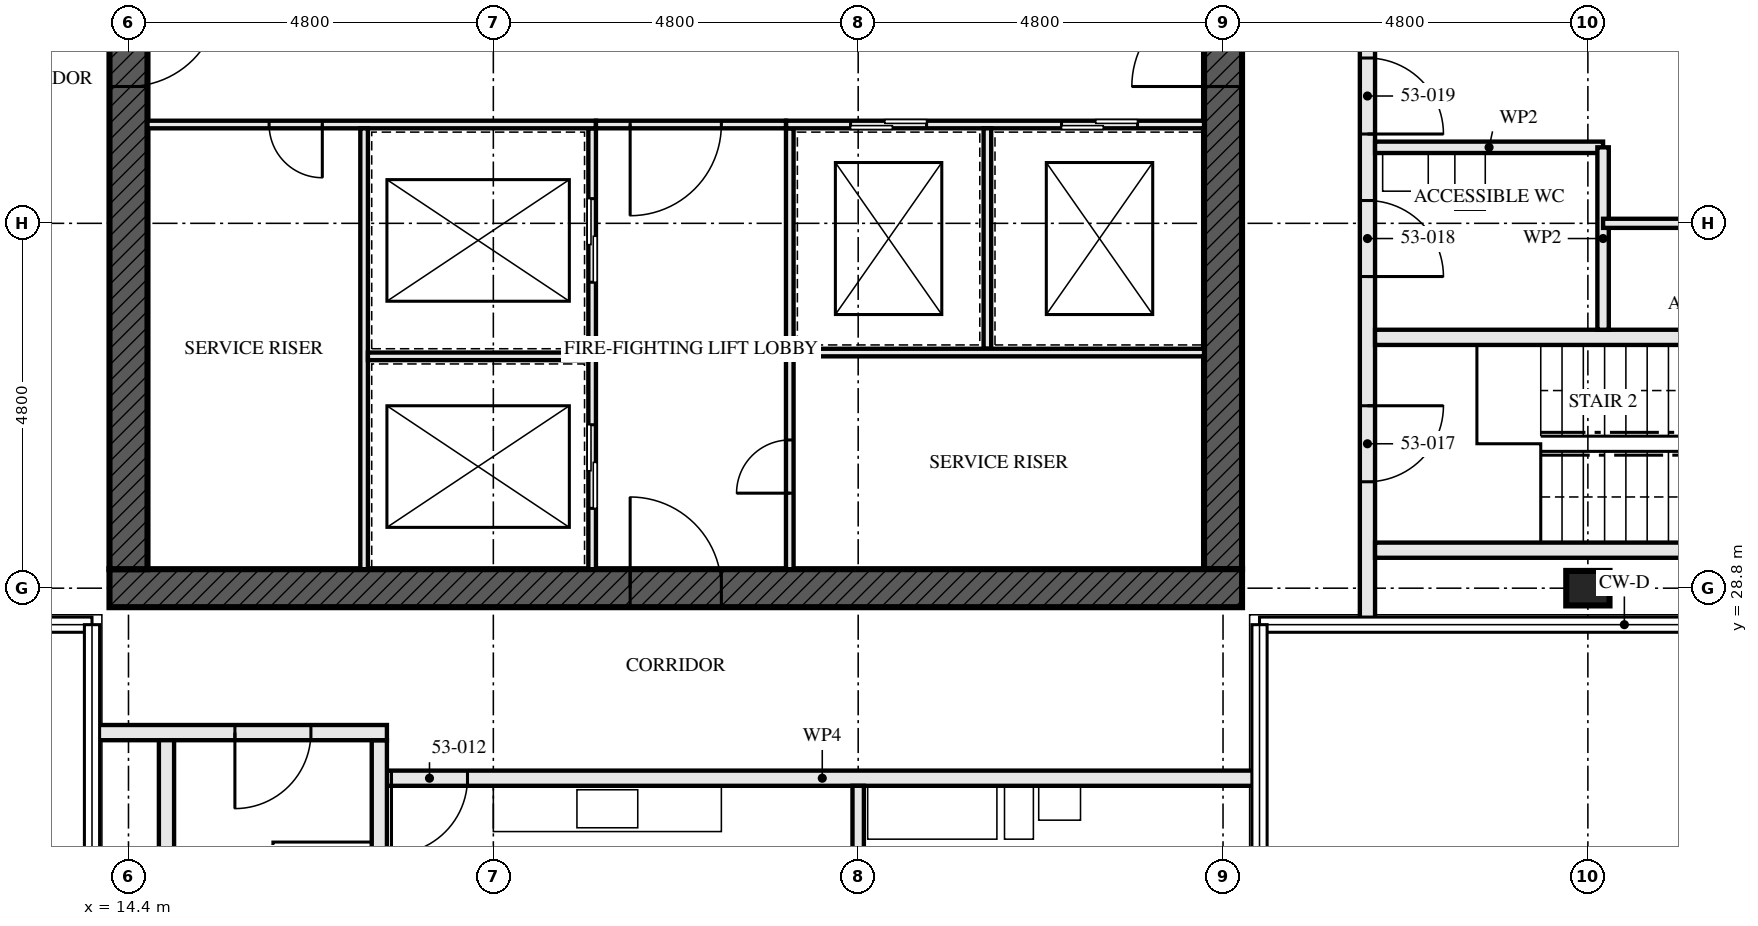
"""IFC4 building model, lengths in metres.
Left out: names, types, materials, properties, quantities, classifications, styles, units other than length and angle.
Written with IfcOpenShell. Run it as: python <this file> out.ifc"""

import sys

from ifc_helpers import new_model, si_unit, direction, frame, frame_2d, origin, origin_2d, place, context, subcontext, project, spatial, rectangle, i_section, extrude, element, fill, save


model = new_model("IFC4")
c1 = context("Model", 3, precision=1e-05, world=origin(), true_north=direction((0.0, 1.0)))
c2 = subcontext(c1, "Body", "Model", "MODEL_VIEW")
j1 = project(units=[si_unit("LENGTHUNIT", "METRE"), si_unit("PLANEANGLEUNIT", "RADIAN")], contexts=[c1])
p1 = place(None, origin())
s1 = spatial("IfcSite", under=j1, at=p1, CompositionType="ELEMENT")
p2 = place(p1, origin())
s2 = spatial("IfcBuilding", under=s1, at=p2, CompositionType="ELEMENT")
p3 = place(p2, frame((0.0, 0.0, 194.5)))
s3 = spatial("IfcBuildingStorey", under=s2, at=p3, CompositionType="ELEMENT", Elevation=194.5)
p4 = place(p3, frame((33.6, 28.8, 0.0), z_axis=(0.0, 0.0, 1.0), x_axis=(0.0, 1.0, 0.0)))
e1 = element("IfcColumn", 1, at=p4, inside=s3, PredefinedType="COLUMN", context=c2, shape_type="SweptSolid", body=[
    extrude(i_section(OverallWidth=0.454, OverallDepth=0.569, WebThickness=0.078, FlangeThickness=0.125, FilletRadius=0.015, at=origin_2d()), origin(), (0.0, 0.0, 1.0), 3.5),
])
p5 = place(p3, frame((14.15, 28.8, -0.17), z_axis=(0.0, 0.0, 1.0), x_axis=(1.0, 0.0, 0.0)))
e2 = element("IfcWall", 2, at=p5, inside=s3, PredefinedType="SHEAR", context=c2, shape_type="SweptSolid", body=[
    extrude(rectangle(XDim=14.9, YDim=0.5, at=frame_2d((7.45, 0.0))), origin(), (0.0, 0.0, 1.0), 3.5),
])
p6 = place(p5, frame((6.85, 0.0, 0.17)))
e3 = element("IfcOpeningElement", 3, at=p6, cuts=e2, PredefinedType="OPENING", context=c2, shape_type="SweptSolid", body=[
    extrude(rectangle(XDim=1.2, YDim=2.1, at=frame_2d((0.6, 1.05))), frame((0.0, 0.26, 0.0), z_axis=(0.0, -1.0, 0.0), x_axis=(1.0, 0.0, 0.0)), (0.0, 0.0, 1.0), 0.521),
])
p7 = place(p3, frame((14.4, 42.95, -0.17), z_axis=(0.0, 0.0, 1.0), x_axis=(0.0, -1.0, 0.0)))
e4 = element("IfcWall", 4, at=p7, inside=s3, PredefinedType="SHEAR", context=c2, shape_type="SweptSolid", body=[
    extrude(rectangle(XDim=13.9, YDim=0.5, at=frame_2d((6.95, 0.0))), origin(), (0.0, 0.0, 1.0), 3.5),
])
p8 = place(p7, frame((6.35, 0.0, 0.17)))
e5 = element("IfcOpeningElement", 5, at=p8, cuts=e4, PredefinedType="OPENING", context=c2, shape_type="SweptSolid", body=[
    extrude(rectangle(XDim=1.2, YDim=2.1, at=frame_2d((0.6, 1.05))), frame((0.0, 0.26, 0.0), z_axis=(0.0, -1.0, 0.0), x_axis=(1.0, 0.0, 0.0)), (0.0, 0.0, 1.0), 0.521),
])
p9 = place(p3, frame((28.8, 29.05, -0.17), z_axis=(0.0, 0.0, 1.0), x_axis=(0.0, 1.0, 0.0)))
e6 = element("IfcWall", 6, at=p9, inside=s3, PredefinedType="SHEAR", context=c2, shape_type="SweptSolid", body=[
    extrude(rectangle(XDim=13.9, YDim=0.5, at=frame_2d((6.95, 0.0))), origin(), (0.0, 0.0, 1.0), 3.5),
])
p10 = place(p9, frame((6.35, 0.0, 0.17)))
e7 = element("IfcOpeningElement", 7, at=p10, cuts=e6, PredefinedType="OPENING", context=c2, shape_type="SweptSolid", body=[
    extrude(rectangle(XDim=1.2, YDim=2.1, at=frame_2d((0.6, 1.05))), frame((0.0, 0.26, 0.0), z_axis=(0.0, -1.0, 0.0), x_axis=(1.0, 0.0, 0.0)), (0.0, 0.0, 1.0), 0.521),
])
for number, where, z_axis, x_axis in (
    (8, (14.9, 22.1, 0.0), (0.0, 0.0, 1.0), (0.0, 1.0, 0.0)),
    (9, (17.7, 22.1, 0.0), (0.0, 0.0, 1.0), (0.0, 1.0, 0.0)),
):
    element("IfcWall", number, at=place(p3, frame(where, z_axis=z_axis, x_axis=x_axis)), inside=s3, PredefinedType="SOLIDWALL", context=c2, shape_type="SweptSolid", body=[
        extrude(rectangle(XDim=4.7, YDim=0.2, at=frame_2d((2.35, 0.0))), origin(), (0.0, 0.0, 1.0), 2.99),
    ])
p11 = place(p3, frame((13.945, 26.9, 0.0), z_axis=(0.0, 0.0, 1.0), x_axis=(1.0, 0.0, 0.0)))
e10 = element("IfcWall", 10, at=p11, inside=s3, PredefinedType="SOLIDWALL", context=c2, shape_type="SweptSolid", body=[
    extrude(rectangle(XDim=3.855, YDim=0.2, at=frame_2d((1.927, 0.0))), origin(), (0.0, 0.0, 1.0), 2.32),
])
p12 = place(p11, frame((1.855, 0.0, 0.0)))
e11 = element("IfcOpeningElement", 11, at=p12, cuts=e10, PredefinedType="OPENING", context=c2, shape_type="SweptSolid", body=[
    extrude(rectangle(XDim=1.0, YDim=2.1, at=frame_2d((0.5, 1.05))), frame((0.0, 0.111, 0.0), z_axis=(0.0, -1.0, 0.0), x_axis=(1.0, 0.0, 0.0)), (0.0, 0.0, 1.0), 0.221),
])
p13 = place(p3, frame((24.0, 23.2, 0.0), z_axis=(0.0, 0.0, 1.0), x_axis=(0.0, 1.0, 0.0)))
e12 = element("IfcWall", 12, at=p13, inside=s3, PredefinedType="PARTITIONING", context=c2, shape_type="SweptSolid", body=[
    extrude(rectangle(XDim=3.0, YDim=0.15, at=frame_2d((1.5, 0.0))), origin(), (0.0, 0.0, 1.0), 2.55),
])
p14 = place(p13, frame((1.05, 0.0, 0.0)))
e13 = element("IfcOpeningElement", 13, at=p14, cuts=e12, PredefinedType="OPENING", context=c2, shape_type="SweptSolid", body=[
    extrude(rectangle(XDim=0.9, YDim=2.1, at=frame_2d((0.45, 1.05))), frame((0.0, 0.085, 0.0), z_axis=(0.0, -1.0, 0.0), x_axis=(1.0, 0.0, 0.0)), (0.0, 0.0, 1.0), 0.171),
])
p15 = place(p3, frame((17.8, 26.3, 0.0), z_axis=(0.0, 0.0, 1.0), x_axis=(1.0, 0.0, 0.0)))
e14 = element("IfcWall", 14, at=p15, inside=s3, PredefinedType="PARTITIONING", context=c2, shape_type="SweptSolid", body=[
    extrude(rectangle(XDim=11.455, YDim=0.2, at=frame_2d((5.728, 0.0))), origin(), (0.0, 0.0, 1.0), 2.32),
])
p16 = place(p15, frame((0.06, 0.0, 0.0)))
e15 = element("IfcOpeningElement", 15, at=p16, cuts=e14, PredefinedType="OPENING", context=c2, shape_type="SweptSolid", body=[
    extrude(rectangle(XDim=1.0, YDim=2.1, at=frame_2d((0.5, 1.05))), frame((0.0, 0.111, 0.0), z_axis=(0.0, -1.0, 0.0), x_axis=(1.0, 0.0, 0.0)), (0.0, 0.0, 1.0), 0.221),
])
for number, where, z_axis, x_axis in (
    (16, (35.5, 29.3, 0.0), (0.0, 0.0, 1.0), (-1.0, 0.0, 0.0)),
    (17, (35.5, 32.1, 0.0), (0.0, 0.0, 1.0), (-1.0, 0.0, 0.0)),
):
    element("IfcWall", number, at=place(p3, frame(where, z_axis=z_axis, x_axis=x_axis)), inside=s3, PredefinedType="SOLIDWALL", context=c2, shape_type="SweptSolid", body=[
        extrude(rectangle(XDim=4.7, YDim=0.2, at=frame_2d((2.35, 0.0))), origin(), (0.0, 0.0, 1.0), 2.99),
    ])
p17 = place(p3, frame((33.8, 32.2, 0.0), z_axis=(0.0, 0.0, 1.0), x_axis=(0.0, 1.0, 0.0)))
e18 = element("IfcWall", 18, at=p17, inside=s3, PredefinedType="PARTITIONING", context=c2, shape_type="SweptSolid", body=[
    extrude(rectangle(XDim=2.4, YDim=0.15, at=frame_2d((1.2, 0.0))), origin(), (0.0, 0.0, 1.0), 2.55),
])
p18 = place(p3, frame((33.8, 34.6, 0.0), z_axis=(0.0, 0.0, 1.0), x_axis=(-1.0, 0.0, 0.0)))
e19 = element("IfcWall", 19, at=p18, inside=s3, PredefinedType="PARTITIONING", context=c2, shape_type="SweptSolid", body=[
    extrude(rectangle(XDim=3.0, YDim=0.15, at=frame_2d((1.5, 0.0))), origin(), (0.0, 0.0, 1.0), 3.33),
])
p19 = place(p3, frame((38.08, 33.6, 0.0), z_axis=(0.0, 0.0, 1.0), x_axis=(-1.0, 0.0, 0.0)))
e20 = element("IfcWall", 20, at=p19, inside=s3, PredefinedType="PARTITIONING", context=c2, shape_type="SweptSolid", body=[
    extrude(rectangle(XDim=4.28, YDim=0.12, at=frame_2d((2.14, 0.0))), origin(), (0.0, 0.0, 1.0), 2.55),
])
p20 = place(p19, frame((1.78, 0.0, 0.0)))
e21 = element("IfcOpeningElement", 21, at=p20, cuts=e20, PredefinedType="OPENING", context=c2, shape_type="SweptSolid", body=[
    extrude(rectangle(XDim=0.9, YDim=2.1, at=frame_2d((0.45, 1.05))), frame((0.0, 0.071, 0.0), z_axis=(0.0, -1.0, 0.0), x_axis=(1.0, 0.0, 0.0)), (0.0, 0.0, 1.0), 0.141),
])
p21 = place(p3, frame((30.7, 28.345, 0.0), z_axis=(0.0, 0.0, 1.0), x_axis=(0.0, 1.0, 0.0)))
e22 = element("IfcWall", 22, at=p21, inside=s3, PredefinedType="PARTITIONING", context=c2, shape_type="SweptSolid", body=[
    extrude(rectangle(XDim=15.31, YDim=0.2, at=frame_2d((7.655, 0.0))), origin(), (0.0, 0.0, 1.0), 2.32),
])
p22 = place(p21, frame((1.855, 0.0, 0.0)))
e23 = element("IfcOpeningElement", 23, at=p22, cuts=e22, PredefinedType="OPENING", context=c2, shape_type="SweptSolid", body=[
    extrude(rectangle(XDim=1.0, YDim=2.1, at=frame_2d((0.5, 1.05))), frame((0.0, 0.111, 0.0), z_axis=(0.0, -1.0, 0.0), x_axis=(1.0, 0.0, 0.0)), (0.0, 0.0, 1.0), 0.221),
])
p23 = place(p21, frame((4.555, 0.0, 0.0)))
e24 = element("IfcOpeningElement", 24, at=p23, cuts=e22, PredefinedType="OPENING", context=c2, shape_type="SweptSolid", body=[
    extrude(rectangle(XDim=1.0, YDim=2.1, at=frame_2d((0.5, 1.05))), frame((0.0, 0.111, 0.0), z_axis=(0.0, -1.0, 0.0), x_axis=(1.0, 0.0, 0.0)), (0.0, 0.0, 1.0), 0.221),
])
p24 = place(p21, frame((6.43, 0.0, 0.0)))
e25 = element("IfcOpeningElement", 25, at=p24, cuts=e22, PredefinedType="OPENING", context=c2, shape_type="SweptSolid", body=[
    extrude(rectangle(XDim=1.0, YDim=2.1, at=frame_2d((0.5, 1.05))), frame((0.0, 0.111, 0.0), z_axis=(0.0, -1.0, 0.0), x_axis=(1.0, 0.0, 0.0)), (0.0, 0.0, 1.0), 0.221),
])
p25 = place(p3, frame((20.5, 29.05, 0.0), z_axis=(0.0, 0.0, 1.0), x_axis=(0.0, 1.0, 0.0)))
e26 = element("IfcWall", 26, at=p25, inside=s3, PredefinedType="SOLIDWALL", context=c2, shape_type="SweptSolid", body=[
    extrude(rectangle(XDim=5.8, YDim=0.1, at=frame_2d((2.9, 0.0))), origin(), (0.0, 0.0, 1.0), 3.33),
])
p26 = place(p25, frame((0.8, 0.0, 0.0)))
e27 = element("IfcOpeningElement", 27, at=p26, cuts=e26, PredefinedType="OPENING", context=c2, shape_type="SweptSolid", body=[
    extrude(rectangle(XDim=1.1, YDim=2.3, at=frame_2d((0.55, 1.15))), frame((0.0, 0.061, 0.0), z_axis=(0.0, -1.0, 0.0), x_axis=(1.0, 0.0, 0.0)), (0.0, 0.0, 1.0), 0.121),
])
p27 = place(p25, frame((3.775, 0.0, 0.0)))
e28 = element("IfcOpeningElement", 28, at=p27, cuts=e26, PredefinedType="OPENING", context=c2, shape_type="SweptSolid", body=[
    extrude(rectangle(XDim=1.1, YDim=2.3, at=frame_2d((0.55, 1.15))), frame((0.0, 0.061, 0.0), z_axis=(0.0, -1.0, 0.0), x_axis=(1.0, 0.0, 0.0)), (0.0, 0.0, 1.0), 0.121),
])
p28 = place(p3, frame((23.1, 29.05, 0.0), z_axis=(0.0, 0.0, 1.0), x_axis=(0.0, 1.0, 0.0)))
e29 = element("IfcWall", 29, at=p28, inside=s3, PredefinedType="SOLIDWALL", context=c2, shape_type="SweptSolid", body=[
    extrude(rectangle(XDim=5.8, YDim=0.1, at=frame_2d((2.9, 0.0))), origin(), (0.0, 0.0, 1.0), 3.33),
])
p29 = place(p28, frame((1.0, 0.0, 0.0)))
e30 = element("IfcOpeningElement", 30, at=p29, cuts=e29, PredefinedType="OPENING", context=c2, shape_type="SweptSolid", body=[
    extrude(rectangle(XDim=0.7, YDim=2.1, at=frame_2d((0.35, 1.05))), frame((0.0, 0.061, 0.0), z_axis=(0.0, -1.0, 0.0), x_axis=(1.0, 0.0, 0.0)), (0.0, 0.0, 1.0), 0.121),
])
p30 = place(p3, frame((14.65, 34.9, 0.0), z_axis=(0.0, 0.0, 1.0), x_axis=(1.0, 0.0, 0.0)))
e31 = element("IfcWall", 31, at=p30, inside=s3, PredefinedType="SOLIDWALL", context=c2, shape_type="SweptSolid", body=[
    extrude(rectangle(XDim=5.9, YDim=0.1, at=frame_2d((2.95, 0.0))), origin(), (0.0, 0.0, 1.0), 3.33),
])
p31 = place(p30, frame((1.6, 0.0, 0.0)))
e32 = element("IfcOpeningElement", 32, at=p31, cuts=e31, PredefinedType="OPENING", context=c2, shape_type="SweptSolid", body=[
    extrude(rectangle(XDim=0.7, YDim=2.1, at=frame_2d((0.35, 1.05))), frame((0.0, 0.061, 0.0), z_axis=(0.0, -1.0, 0.0), x_axis=(1.0, 0.0, 0.0)), (0.0, 0.0, 1.0), 0.121),
])
p32 = place(p3, frame((23.05, 34.9, 0.0), z_axis=(0.0, 0.0, 1.0), x_axis=(1.0, 0.0, 0.0)))
e33 = element("IfcWall", 33, at=p32, inside=s3, PredefinedType="SOLIDWALL", context=c2, shape_type="SweptSolid", body=[
    extrude(rectangle(XDim=5.5, YDim=0.1, at=frame_2d((2.75, 0.0))), origin(), (0.0, 0.0, 1.0), 3.33),
])
p33 = place(p32, frame((0.85, 0.0, 0.0)))
e34 = element("IfcOpeningElement", 34, at=p33, cuts=e33, PredefinedType="OPENING", context=c2, shape_type="SweptSolid", body=[
    extrude(rectangle(XDim=1.0, YDim=2.1, at=frame_2d((0.5, 1.05))), frame((0.0, 0.061, 0.0), z_axis=(0.0, -1.0, 0.0), x_axis=(1.0, 0.0, 0.0)), (0.0, 0.0, 1.0), 0.121),
])
p34 = place(p32, frame((3.625, 0.0, 0.0)))
e35 = element("IfcOpeningElement", 35, at=p34, cuts=e33, PredefinedType="OPENING", context=c2, shape_type="SweptSolid", body=[
    extrude(rectangle(XDim=1.0, YDim=2.1, at=frame_2d((0.5, 1.05))), frame((0.0, 0.061, 0.0), z_axis=(0.0, -1.0, 0.0), x_axis=(1.0, 0.0, 0.0)), (0.0, 0.0, 1.0), 0.121),
])
p35 = place(p3, frame((20.55, 34.9, 0.0), z_axis=(0.0, 0.0, 1.0), x_axis=(1.0, 0.0, 0.0)))
e36 = element("IfcWall", 36, at=p35, inside=s3, PredefinedType="SOLIDWALL", context=c2, shape_type="SweptSolid", body=[
    extrude(rectangle(XDim=2.5, YDim=0.1, at=frame_2d((1.25, 0.0))), origin(), (0.0, 0.0, 1.0), 3.33),
])
p36 = place(p35, frame((0.45, 0.0, 0.0)))
e37 = element("IfcOpeningElement", 37, at=p36, cuts=e36, PredefinedType="OPENING", context=c2, shape_type="SweptSolid", body=[
    extrude(rectangle(XDim=1.2, YDim=2.1, at=frame_2d((0.6, 1.05))), frame((0.0, 0.061, 0.0), z_axis=(0.0, -1.0, 0.0), x_axis=(1.0, 0.0, 0.0)), (0.0, 0.0, 1.0), 0.121),
])
p37 = place(p3, frame((17.5, 29.05, 0.0), z_axis=(0.0, 0.0, 1.0), x_axis=(0.0, 1.0, 0.0)))
e38 = element("IfcWall", 38, at=p37, inside=s3, PredefinedType="SOLIDWALL", context=c2, shape_type="SweptSolid", body=[
    extrude(rectangle(XDim=5.8, YDim=0.1, at=frame_2d((2.9, 0.0))), origin(), (0.0, 0.0, 1.0), 3.33),
])
p38 = place(p3, frame((17.55, 31.85, 0.0), z_axis=(0.0, 0.0, 1.0), x_axis=(1.0, 0.0, 0.0)))
e39 = element("IfcWall", 39, at=p38, inside=s3, PredefinedType="SOLIDWALL", context=c2, shape_type="SweptSolid", body=[
    extrude(rectangle(XDim=2.9, YDim=0.1, at=frame_2d((1.45, 0.0))), origin(), (0.0, 0.0, 1.0), 3.33),
])
p39 = place(p3, frame((25.7, 31.95, 0.0), z_axis=(0.0, 0.0, 1.0), x_axis=(0.0, 1.0, 0.0)))
e40 = element("IfcWall", 40, at=p39, inside=s3, PredefinedType="SOLIDWALL", context=c2, shape_type="SweptSolid", body=[
    extrude(rectangle(XDim=2.9, YDim=0.1, at=frame_2d((1.45, 0.0))), origin(), (0.0, 0.0, 1.0), 3.33),
])
p40 = place(p3, frame((23.15, 31.9, 0.0), z_axis=(0.0, 0.0, 1.0), x_axis=(1.0, 0.0, 0.0)))
e41 = element("IfcWall", 41, at=p40, inside=s3, PredefinedType="SOLIDWALL", context=c2, shape_type="SweptSolid", body=[
    extrude(rectangle(XDim=5.4, YDim=0.1, at=frame_2d((2.7, 0.0))), origin(), (0.0, 0.0, 1.0), 3.33),
])
p41 = place(p12, frame((1.0, 0.0, 0.0), z_axis=(0.0, 0.0, 1.0), x_axis=(-1.0, 0.0, 0.0)))
e42 = element("IfcDoor", 42, at=p41, inside=s3, OperationType="SINGLE_SWING_LEFT", PredefinedType="DOOR", context=c2, shape_type="SweptSolid", body=[
    extrude(rectangle(XDim=1.0, YDim=2.1, at=frame_2d((0.5, 1.05))), frame((0.0, 0.032, 0.0), z_axis=(0.0, -1.0, 0.0), x_axis=(1.0, 0.0, 0.0)), (0.0, 0.0, 1.0), 0.064),
])
fill(e11, e42)
p42 = place(p16, frame((1.0, 0.0, 0.0), z_axis=(0.0, 0.0, 1.0), x_axis=(-1.0, 0.0, 0.0)))
e43 = element("IfcDoor", 43, at=p42, inside=s3, OperationType="SINGLE_SWING_LEFT", PredefinedType="DOOR", context=c2, shape_type="SweptSolid", body=[
    extrude(rectangle(XDim=1.0, YDim=2.1, at=frame_2d((0.5, 1.05))), frame((0.0, 0.027, 0.0), z_axis=(0.0, -1.0, 0.0), x_axis=(1.0, 0.0, 0.0)), (0.0, 0.0, 1.0), 0.054),
])
fill(e15, e43)
p43 = place(p22, frame((1.0, 0.0, 0.0), z_axis=(0.0, 0.0, 1.0), x_axis=(-1.0, 0.0, 0.0)))
e44 = element("IfcDoor", 44, at=p43, inside=s3, OperationType="SINGLE_SWING_RIGHT", PredefinedType="DOOR", context=c2, shape_type="SweptSolid", body=[
    extrude(rectangle(XDim=1.0, YDim=2.1, at=frame_2d((0.5, 1.05))), frame((0.0, 0.032, 0.0), z_axis=(0.0, -1.0, 0.0), x_axis=(1.0, 0.0, 0.0)), (0.0, 0.0, 1.0), 0.064),
])
fill(e23, e44)
p44 = place(p23, frame((1.0, 0.0, 0.0), z_axis=(0.0, 0.0, 1.0), x_axis=(-1.0, 0.0, 0.0)))
e45 = element("IfcDoor", 45, at=p44, inside=s3, OperationType="SINGLE_SWING_LEFT", PredefinedType="DOOR", context=c2, shape_type="SweptSolid", body=[
    extrude(rectangle(XDim=1.0, YDim=2.1, at=frame_2d((0.5, 1.05))), frame((0.0, 0.027, 0.0), z_axis=(0.0, -1.0, 0.0), x_axis=(1.0, 0.0, 0.0)), (0.0, 0.0, 1.0), 0.054),
])
fill(e24, e45)
p45 = place(p24, frame((1.0, 0.0, 0.0), z_axis=(0.0, 0.0, 1.0), x_axis=(-1.0, 0.0, 0.0)))
e46 = element("IfcDoor", 46, at=p45, inside=s3, OperationType="SINGLE_SWING_LEFT", PredefinedType="DOOR", context=c2, shape_type="SweptSolid", body=[
    extrude(rectangle(XDim=1.0, YDim=2.1, at=frame_2d((0.5, 1.05))), frame((0.0, 0.027, 0.0), z_axis=(0.0, -1.0, 0.0), x_axis=(1.0, 0.0, 0.0)), (0.0, 0.0, 1.0), 0.054),
])
fill(e25, e46)
p46 = place(p26, origin())
e47 = element("IfcDoor", 47, at=p46, inside=s3, OperationType="SLIDING_TO_LEFT", PredefinedType="DOOR", context=c2, shape_type="SweptSolid", body=[
    extrude(rectangle(XDim=1.1, YDim=2.3, at=frame_2d((0.55, 1.15))), frame((0.0, 0.05, 0.0), z_axis=(0.0, -1.0, 0.0), x_axis=(1.0, 0.0, 0.0)), (0.0, 0.0, 1.0), 0.1),
])
fill(e27, e47)
p47 = place(p27, origin())
e48 = element("IfcDoor", 48, at=p47, inside=s3, OperationType="SLIDING_TO_LEFT", PredefinedType="DOOR", context=c2, shape_type="SweptSolid", body=[
    extrude(rectangle(XDim=1.1, YDim=2.3, at=frame_2d((0.55, 1.15))), frame((0.0, 0.05, 0.0), z_axis=(0.0, -1.0, 0.0), x_axis=(1.0, 0.0, 0.0)), (0.0, 0.0, 1.0), 0.1),
])
fill(e28, e48)
p48 = place(p29, origin())
e49 = element("IfcDoor", 49, at=p48, inside=s3, OperationType="SINGLE_SWING_RIGHT", PredefinedType="DOOR", context=c2, shape_type="SweptSolid", body=[
    extrude(rectangle(XDim=0.7, YDim=2.1, at=frame_2d((0.35, 1.05))), frame((0.0, 0.027, 0.0), z_axis=(0.0, -1.0, 0.0), x_axis=(1.0, 0.0, 0.0)), (0.0, 0.0, 1.0), 0.054),
])
fill(e30, e49)
p49 = place(p31, frame((0.7, 0.0, 0.0), z_axis=(0.0, 0.0, 1.0), x_axis=(-1.0, 0.0, 0.0)))
e50 = element("IfcDoor", 50, at=p49, inside=s3, OperationType="SINGLE_SWING_RIGHT", PredefinedType="DOOR", context=c2, shape_type="SweptSolid", body=[
    extrude(rectangle(XDim=0.7, YDim=2.1, at=frame_2d((0.35, 1.05))), frame((0.0, 0.027, 0.0), z_axis=(0.0, -1.0, 0.0), x_axis=(1.0, 0.0, 0.0)), (0.0, 0.0, 1.0), 0.054),
])
fill(e32, e50)
p50 = place(p33, origin())
e51 = element("IfcDoor", 51, at=p50, inside=s3, OperationType="SLIDING_TO_LEFT", PredefinedType="DOOR", context=c2, shape_type="SweptSolid", body=[
    extrude(rectangle(XDim=1.0, YDim=2.1, at=frame_2d((0.5, 1.05))), frame((0.0, 0.05, 0.0), z_axis=(0.0, -1.0, 0.0), x_axis=(1.0, 0.0, 0.0)), (0.0, 0.0, 1.0), 0.1),
])
fill(e34, e51)
p51 = place(p34, origin())
e52 = element("IfcDoor", 52, at=p51, inside=s3, OperationType="SLIDING_TO_LEFT", PredefinedType="DOOR", context=c2, shape_type="SweptSolid", body=[
    extrude(rectangle(XDim=1.0, YDim=2.1, at=frame_2d((0.5, 1.05))), frame((0.0, 0.05, 0.0), z_axis=(0.0, -1.0, 0.0), x_axis=(1.0, 0.0, 0.0)), (0.0, 0.0, 1.0), 0.1),
])
fill(e35, e52)
p52 = place(p36, frame((1.2, 0.0, 0.0), z_axis=(0.0, 0.0, 1.0), x_axis=(-1.0, 0.0, 0.0)))
e53 = element("IfcDoor", 53, at=p52, inside=s3, OperationType="SINGLE_SWING_LEFT", PredefinedType="DOOR", context=c2, shape_type="SweptSolid", body=[
    extrude(rectangle(XDim=1.2, YDim=2.1, at=frame_2d((0.6, 1.05))), frame((0.0, 0.027, 0.0), z_axis=(0.0, -1.0, 0.0), x_axis=(1.0, 0.0, 0.0)), (0.0, 0.0, 1.0), 0.054),
])
fill(e37, e53)
p53 = place(p6, origin())
e54 = element("IfcDoor", 54, at=p53, inside=s3, OperationType="SINGLE_SWING_LEFT", PredefinedType="DOOR", context=c2, shape_type="SweptSolid", body=[
    extrude(rectangle(XDim=1.2, YDim=2.1, at=frame_2d((0.6, 1.05))), frame((0.0, 0.027, 0.0), z_axis=(0.0, -1.0, 0.0), x_axis=(1.0, 0.0, 0.0)), (0.0, 0.0, 1.0), 0.054),
])
fill(e3, e54)
p54 = place(p8, origin())
e55 = element("IfcDoor", 55, at=p54, inside=s3, OperationType="SINGLE_SWING_LEFT", PredefinedType="DOOR", context=c2, shape_type="SweptSolid", body=[
    extrude(rectangle(XDim=1.2, YDim=2.1, at=frame_2d((0.6, 1.05))), frame((0.0, 0.027, 0.0), z_axis=(0.0, -1.0, 0.0), x_axis=(1.0, 0.0, 0.0)), (0.0, 0.0, 1.0), 0.054),
])
fill(e5, e55)
p55 = place(p10, origin())
e56 = element("IfcDoor", 56, at=p55, inside=s3, OperationType="SINGLE_SWING_LEFT", PredefinedType="DOOR", context=c2, shape_type="SweptSolid", body=[
    extrude(rectangle(XDim=1.2, YDim=2.1, at=frame_2d((0.6, 1.05))), frame((0.0, 0.027, 0.0), z_axis=(0.0, -1.0, 0.0), x_axis=(1.0, 0.0, 0.0)), (0.0, 0.0, 1.0), 0.054),
])
fill(e7, e56)
save(model, sys.argv[1])
